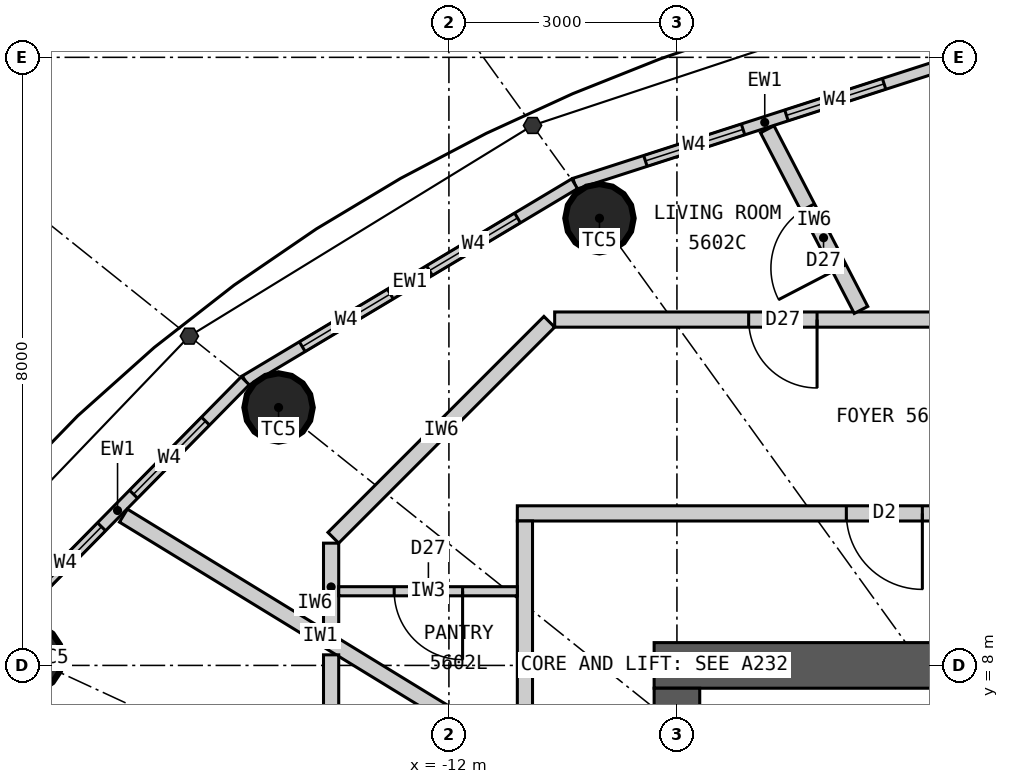
"""IFC4 building model, lengths in metres.
Left out: names, types, materials, properties, quantities, classifications, styles, units other than length and angle.
Written with IfcOpenShell. Run it as: python <this file> out.ifc"""

import sys

from ifc_helpers import new_model, si_unit, direction, frame, frame_2d, origin, origin_2d, place, context, subcontext, project, spatial, rectangle, circle, extrude, element, fill, save


model = new_model("IFC4")
c1 = context("Model", 3, precision=1e-05, world=origin(), true_north=direction((0.0, 1.0)))
c2 = subcontext(c1, "Body", "Model", "MODEL_VIEW")
j1 = project(units=[si_unit("LENGTHUNIT", "METRE"), si_unit("PLANEANGLEUNIT", "RADIAN")], contexts=[c1])
p1 = place(None, origin())
s1 = spatial("IfcSite", under=j1, at=p1, CompositionType="ELEMENT")
p2 = place(p1, origin())
s2 = spatial("IfcBuilding", under=s1, at=p2, CompositionType="ELEMENT")
p3 = place(p2, frame((0.0, 0.0, 209.4)))
s3 = spatial("IfcBuildingStorey", under=s2, at=p3, CompositionType="ELEMENT", Elevation=209.4)
for number, where, z_axis, x_axis in (
    (1, (-10.019, 13.883, 0.0), (0.0, 0.0, 1.0), (1.0, 0.0, 0.0)),
    (2, (-14.241, 11.393, 0.0), (0.0, 0.0, 1.0), (1.0, 0.0, 0.0)),
    (3, (-17.532, 8.098, 0.0), (0.0, 0.0, 1.0), (1.0, 0.0, 0.0)),
):
    element("IfcColumn", number, at=place(p3, frame(where, z_axis=z_axis, x_axis=x_axis)), inside=s3, PredefinedType="COLUMN", context=c2, shape_type="SweptSolid", body=[
        extrude(circle(Radius=0.45, at=origin_2d()), origin(), (0.0, 0.0, 1.0), 3.3),
    ])
p4 = place(p3, frame((-9.3, 8.0, 0.0), z_axis=(0.0, 0.0, 1.0), x_axis=(1.0, 0.0, 0.0)))
e4 = element("IfcWall", 4, at=p4, inside=s3, PredefinedType="SHEAR", context=c2, shape_type="SweptSolid", body=[
    extrude(rectangle(XDim=18.6, YDim=0.6, at=frame_2d((9.3, 0.0))), origin(), (0.0, 0.0, 1.0), 3.3),
])
p5 = place(p4, frame((8.0, 0.0, 0.0)))
e5 = element("IfcOpeningElement", 5, at=p5, cuts=e4, PredefinedType="OPENING", context=c2, shape_type="SweptSolid", body=[
    extrude(rectangle(XDim=1.2, YDim=2.2, at=frame_2d((0.6, 1.1))), frame((0.0, 0.31, 0.0), z_axis=(0.0, -1.0, 0.0), x_axis=(1.0, 0.0, 0.0)), (0.0, 0.0, 1.0), 0.62),
])
p6 = place(p4, frame((15.6, 0.0, 0.0)))
e6 = element("IfcOpeningElement", 6, at=p6, cuts=e4, PredefinedType="OPENING", context=c2, shape_type="SweptSolid", body=[
    extrude(rectangle(XDim=0.9, YDim=2.2, at=frame_2d((0.45, 1.1))), frame((0.0, 0.31, 0.0), z_axis=(0.0, -1.0, 0.0), x_axis=(1.0, 0.0, 0.0)), (0.0, 0.0, 1.0), 0.62),
])
p7 = place(p3, frame((-9.0, 7.7, 0.0), z_axis=(0.0, 0.0, 1.0), x_axis=(0.0, -1.0, 0.0)))
e7 = element("IfcWall", 7, at=p7, inside=s3, PredefinedType="SHEAR", context=c2, shape_type="SweptSolid", body=[
    extrude(rectangle(XDim=15.4, YDim=0.6, at=frame_2d((7.7, 0.0))), origin(), (0.0, 0.0, 1.0), 3.3),
])
p8 = place(p7, frame((6.8, 0.0, 0.0)))
e8 = element("IfcOpeningElement", 8, at=p8, cuts=e7, PredefinedType="OPENING", context=c2, shape_type="SweptSolid", body=[
    extrude(rectangle(XDim=1.8, YDim=2.2, at=frame_2d((0.9, 1.1))), frame((0.0, 0.31, 0.0), z_axis=(0.0, -1.0, 0.0), x_axis=(1.0, 0.0, 0.0)), (0.0, 0.0, 1.0), 0.62),
])
p9 = place(p3, frame((-5.343, 15.952, 0.0), z_axis=(0.0, 0.0, 1.0), x_axis=(-0.951644702515, -0.307200846638, 0.0)))
e9 = element("IfcWall", 9, at=p9, inside=s3, PredefinedType="ELEMENTEDWALL", context=c2, shape_type="SweptSolid", body=[
    extrude(rectangle(XDim=5.258, YDim=0.15, at=frame_2d((2.629, 0.0))), origin(), (0.0, 0.0, 1.0), 3.12),
])
p10 = place(p9, frame((0.979, 0.0, 0.9)))
e10 = element("IfcOpeningElement", 10, at=p10, cuts=e9, PredefinedType="OPENING", context=c2, shape_type="SweptSolid", body=[
    extrude(rectangle(XDim=1.35, YDim=1.9, at=frame_2d((0.675, 0.95))), frame((0.0, 0.085, 0.0), z_axis=(0.0, -1.0, 0.0), x_axis=(1.0, 0.0, 0.0)), (0.0, 0.0, 1.0), 0.17),
])
p11 = place(p9, frame((2.929, 0.0, 0.9)))
e11 = element("IfcOpeningElement", 11, at=p11, cuts=e9, PredefinedType="OPENING", context=c2, shape_type="SweptSolid", body=[
    extrude(rectangle(XDim=1.35, YDim=1.9, at=frame_2d((0.675, 0.95))), frame((0.0, 0.085, 0.0), z_axis=(0.0, -1.0, 0.0), x_axis=(1.0, 0.0, 0.0)), (0.0, 0.0, 1.0), 0.17),
])
p12 = place(p3, frame((-10.346, 14.336, 0.0), z_axis=(0.0, 0.0, 1.0), x_axis=(-0.85822150553, -0.513279502265, 0.0)))
e12 = element("IfcWall", 12, at=p12, inside=s3, PredefinedType="ELEMENTEDWALL", context=c2, shape_type="SweptSolid", body=[
    extrude(rectangle(XDim=5.05, YDim=0.15, at=frame_2d((2.525, 0.0))), origin(), (0.0, 0.0, 1.0), 3.12),
])
p13 = place(p12, frame((0.875, 0.0, 0.9)))
e13 = element("IfcOpeningElement", 13, at=p13, cuts=e12, PredefinedType="OPENING", context=c2, shape_type="SweptSolid", body=[
    extrude(rectangle(XDim=1.35, YDim=1.9, at=frame_2d((0.675, 0.95))), frame((0.0, 0.085, 0.0), z_axis=(0.0, -1.0, 0.0), x_axis=(1.0, 0.0, 0.0)), (0.0, 0.0, 1.0), 0.17),
])
p14 = place(p12, frame((2.825, 0.0, 0.9)))
e14 = element("IfcOpeningElement", 14, at=p14, cuts=e12, PredefinedType="OPENING", context=c2, shape_type="SweptSolid", body=[
    extrude(rectangle(XDim=1.35, YDim=1.9, at=frame_2d((0.675, 0.95))), frame((0.0, 0.085, 0.0), z_axis=(0.0, -1.0, 0.0), x_axis=(1.0, 0.0, 0.0)), (0.0, 0.0, 1.0), 0.17),
])
p15 = place(p3, frame((-14.68, 11.744, 0.0), z_axis=(0.0, 0.0, 1.0), x_axis=(-0.701527379618, -0.712642501993, 0.0)))
e15 = element("IfcWall", 15, at=p15, inside=s3, PredefinedType="ELEMENTEDWALL", context=c2, shape_type="SweptSolid", body=[
    extrude(rectangle(XDim=4.788, YDim=0.15, at=frame_2d((2.394, 0.0))), origin(), (0.0, 0.0, 1.0), 3.12),
])
p16 = place(p15, frame((0.744, 0.0, 0.9)))
e16 = element("IfcOpeningElement", 16, at=p16, cuts=e15, PredefinedType="OPENING", context=c2, shape_type="SweptSolid", body=[
    extrude(rectangle(XDim=1.35, YDim=1.9, at=frame_2d((0.675, 0.95))), frame((0.0, 0.085, 0.0), z_axis=(0.0, -1.0, 0.0), x_axis=(1.0, 0.0, 0.0)), (0.0, 0.0, 1.0), 0.17),
])
p17 = place(p15, frame((2.694, 0.0, 0.9)))
e17 = element("IfcOpeningElement", 17, at=p17, cuts=e15, PredefinedType="OPENING", context=c2, shape_type="SweptSolid", body=[
    extrude(rectangle(XDim=1.35, YDim=1.9, at=frame_2d((0.675, 0.95))), frame((0.0, 0.085, 0.0), z_axis=(0.0, -1.0, 0.0), x_axis=(1.0, 0.0, 0.0)), (0.0, 0.0, 1.0), 0.17),
])
p18 = place(p3, frame((-11.1, 10.0, 0.0), z_axis=(0.0, 0.0, 1.0), x_axis=(1.0, 0.0, 0.0)))
e18 = element("IfcWall", 18, at=p18, inside=s3, PredefinedType="PARTITIONING", context=c2, shape_type="SweptSolid", body=[
    extrude(rectangle(XDim=22.2, YDim=0.2, at=frame_2d((11.1, 0.0))), origin(), (0.0, 0.0, 1.0), 3.12),
])
p19 = place(p18, frame((20.9, 0.0, 0.0)))
e19 = element("IfcOpeningElement", 19, at=p19, cuts=e18, PredefinedType="OPENING", context=c2, shape_type="SweptSolid", body=[
    extrude(rectangle(XDim=1.0, YDim=2.2, at=frame_2d((0.5, 1.1))), frame((0.0, 0.11, 0.0), z_axis=(0.0, -1.0, 0.0), x_axis=(1.0, 0.0, 0.0)), (0.0, 0.0, 1.0), 0.22),
])
p20 = place(p18, frame((4.329, 0.0, 0.0)))
e20 = element("IfcOpeningElement", 20, at=p20, cuts=e18, PredefinedType="OPENING", context=c2, shape_type="SweptSolid", body=[
    extrude(rectangle(XDim=1.0, YDim=2.2, at=frame_2d((0.5, 1.1))), frame((0.0, 0.11, 0.0), z_axis=(0.0, -1.0, 0.0), x_axis=(1.0, 0.0, 0.0)), (0.0, 0.0, 1.0), 0.22),
])
p21 = place(p3, frame((-11.0, 9.9, 0.0), z_axis=(0.0, 0.0, 1.0), x_axis=(0.0, -1.0, 0.0)))
e21 = element("IfcWall", 21, at=p21, inside=s3, PredefinedType="PARTITIONING", context=c2, shape_type="SweptSolid", body=[
    extrude(rectangle(XDim=19.8, YDim=0.2, at=frame_2d((9.9, 0.0))), origin(), (0.0, 0.0, 1.0), 3.12),
])
p22 = place(p21, frame((5.075, 0.0, 0.0)))
e22 = element("IfcOpeningElement", 22, at=p22, cuts=e21, PredefinedType="OPENING", context=c2, shape_type="SweptSolid", body=[
    extrude(rectangle(XDim=1.0, YDim=2.2, at=frame_2d((0.5, 1.1))), frame((0.0, 0.11, 0.0), z_axis=(0.0, -1.0, 0.0), x_axis=(1.0, 0.0, 0.0)), (0.0, 0.0, 1.0), 0.22),
])
p23 = place(p21, frame((18.645, 0.0, 0.0)))
e23 = element("IfcOpeningElement", 23, at=p23, cuts=e21, PredefinedType="OPENING", context=c2, shape_type="SweptSolid", body=[
    extrude(rectangle(XDim=1.0, YDim=2.2, at=frame_2d((0.5, 1.1))), frame((0.0, 0.11, 0.0), z_axis=(0.0, -1.0, 0.0), x_axis=(1.0, 0.0, 0.0)), (0.0, 0.0, 1.0), 0.22),
])
p24 = place(p3, frame((-11.1, 6.797, 0.0), z_axis=(0.0, 0.0, 1.0), x_axis=(-0.852799818179, 0.522237943963, 0.0)))
e24 = element("IfcWall", 24, at=p24, inside=s3, PredefinedType="PARTITIONING", context=c2, shape_type="SweptSolid", body=[
    extrude(rectangle(XDim=6.077, YDim=0.2, at=frame_2d((3.039, 0.0))), origin(), (0.0, 0.0, 1.0), 3.12),
])
p25 = place(p3, frame((6.364, 12.55, 0.0), z_axis=(0.0, 0.0, 1.0), x_axis=(-1.0, 0.0, 0.0)))
e25 = element("IfcWall", 25, at=p25, inside=s3, PredefinedType="PARTITIONING", context=c2, shape_type="SweptSolid", body=[
    extrude(rectangle(XDim=16.972, YDim=0.2, at=frame_2d((8.486, 0.0))), origin(), (0.0, 0.0, 1.0), 3.12),
])
p26 = place(p25, frame((2.525, 0.0, 0.0)))
e26 = element("IfcOpeningElement", 26, at=p26, cuts=e25, PredefinedType="OPENING", context=c2, shape_type="SweptSolid", body=[
    extrude(rectangle(XDim=0.8, YDim=2.1, at=frame_2d((0.4, 1.05))), frame((0.0, 0.11, 0.0), z_axis=(0.0, -1.0, 0.0), x_axis=(1.0, 0.0, 0.0)), (0.0, 0.0, 1.0), 0.22),
])
p27 = place(p25, frame((4.145, 0.0, 0.0)))
e27 = element("IfcOpeningElement", 27, at=p27, cuts=e25, PredefinedType="OPENING", context=c2, shape_type="SweptSolid", body=[
    extrude(rectangle(XDim=0.9, YDim=2.1, at=frame_2d((0.45, 1.05))), frame((0.0, 0.11, 0.0), z_axis=(0.0, -1.0, 0.0), x_axis=(1.0, 0.0, 0.0)), (0.0, 0.0, 1.0), 0.22),
])
p28 = place(p25, frame((13.52, 0.0, 0.0)))
e28 = element("IfcOpeningElement", 28, at=p28, cuts=e25, PredefinedType="OPENING", context=c2, shape_type="SweptSolid", body=[
    extrude(rectangle(XDim=0.9, YDim=2.1, at=frame_2d((0.45, 1.05))), frame((0.0, 0.11, 0.0), z_axis=(0.0, -1.0, 0.0), x_axis=(1.0, 0.0, 0.0)), (0.0, 0.0, 1.0), 0.22),
])
p29 = place(p3, frame((-10.679, 12.521, 0.0), z_axis=(0.0, 0.0, 1.0), x_axis=(-0.707106781187, -0.707106781187, 0.0)))
e29 = element("IfcWall", 29, at=p29, inside=s3, PredefinedType="PARTITIONING", context=c2, shape_type="SweptSolid", body=[
    extrude(rectangle(XDim=4.019, YDim=0.2, at=frame_2d((2.009, 0.0))), origin(), (0.0, 0.0, 1.0), 3.12),
])
p30 = place(p3, frame((-13.55, 9.609, 0.0), z_axis=(0.0, 0.0, 1.0), x_axis=(0.0, -1.0, 0.0)))
e30 = element("IfcWall", 30, at=p30, inside=s3, PredefinedType="PARTITIONING", context=c2, shape_type="SweptSolid", body=[
    extrude(rectangle(XDim=1.153, YDim=0.2, at=frame_2d((0.576, 0.0))), origin(), (0.0, 0.0, 1.0), 3.12),
])
p31 = place(p3, frame((-6.578, 12.677, 0.0), z_axis=(0.0, 0.0, 1.0), x_axis=(-0.460620531465, 0.887597164255, 0.0)))
e31 = element("IfcWall", 31, at=p31, inside=s3, PredefinedType="PARTITIONING", context=c2, shape_type="SweptSolid", body=[
    extrude(rectangle(XDim=2.678, YDim=0.2, at=frame_2d((1.339, 0.0))), origin(), (0.0, 0.0, 1.0), 3.12),
])
p32 = place(p31, frame((0.62, 0.0, 0.0)))
e32 = element("IfcOpeningElement", 32, at=p32, cuts=e31, PredefinedType="OPENING", context=c2, shape_type="SweptSolid", body=[
    extrude(rectangle(XDim=0.9, YDim=2.1, at=frame_2d((0.45, 1.05))), frame((0.0, 0.11, 0.0), z_axis=(0.0, -1.0, 0.0), x_axis=(1.0, 0.0, 0.0)), (0.0, 0.0, 1.0), 0.22),
])
p33 = place(p3, frame((-11.1, 8.976, 0.0), z_axis=(0.0, 0.0, 1.0), x_axis=(-1.0, 0.0, 0.0)))
e33 = element("IfcWall", 33, at=p33, inside=s3, PredefinedType="PARTITIONING", context=c2, shape_type="SweptSolid", body=[
    extrude(rectangle(XDim=2.35, YDim=0.12, at=frame_2d((1.175, 0.0))), origin(), (0.0, 0.0, 1.0), 3.12),
])
p34 = place(p33, frame((0.72, 0.0, 0.0)))
e34 = element("IfcOpeningElement", 34, at=p34, cuts=e33, PredefinedType="OPENING", context=c2, shape_type="SweptSolid", body=[
    extrude(rectangle(XDim=0.9, YDim=2.1, at=frame_2d((0.45, 1.05))), frame((0.0, 0.07, 0.0), z_axis=(0.0, -1.0, 0.0), x_axis=(1.0, 0.0, 0.0)), (0.0, 0.0, 1.0), 0.14),
])
p35 = place(p3, frame((-13.55, 8.139, 0.0), z_axis=(0.0, 0.0, 1.0), x_axis=(0.0, -1.0, 0.0)))
e35 = element("IfcWall", 35, at=p35, inside=s3, PredefinedType="PARTITIONING", context=c2, shape_type="SweptSolid", body=[
    extrude(rectangle(XDim=12.496, YDim=0.2, at=frame_2d((6.248, 0.0))), origin(), (0.0, 0.0, 1.0), 3.12),
])
p36 = place(p35, frame((7.031, 0.0, 0.0)))
e36 = element("IfcOpeningElement", 36, at=p36, cuts=e35, PredefinedType="OPENING", context=c2, shape_type="SweptSolid", body=[
    extrude(rectangle(XDim=0.9, YDim=2.1, at=frame_2d((0.45, 1.05))), frame((0.0, 0.11, 0.0), z_axis=(0.0, -1.0, 0.0), x_axis=(1.0, 0.0, 0.0)), (0.0, 0.0, 1.0), 0.22),
])
p37 = place(p35, frame((9.373, 0.0, 0.0)))
e37 = element("IfcOpeningElement", 37, at=p37, cuts=e35, PredefinedType="OPENING", context=c2, shape_type="SweptSolid", body=[
    extrude(rectangle(XDim=0.8, YDim=2.1, at=frame_2d((0.4, 1.05))), frame((0.0, 0.11, 0.0), z_axis=(0.0, -1.0, 0.0), x_axis=(1.0, 0.0, 0.0)), (0.0, 0.0, 1.0), 0.22),
])
p38 = place(p35, frame((3.789, 0.0, 0.0)))
e38 = element("IfcOpeningElement", 38, at=p38, cuts=e35, PredefinedType="OPENING", context=c2, shape_type="SweptSolid", body=[
    extrude(rectangle(XDim=0.9, YDim=2.1, at=frame_2d((0.45, 1.05))), frame((0.0, 0.11, 0.0), z_axis=(0.0, -1.0, 0.0), x_axis=(1.0, 0.0, 0.0)), (0.0, 0.0, 1.0), 0.22),
])
p39 = place(p10, origin())
e39 = element("IfcWindow", 39, at=p39, inside=s3, PartitioningType="SINGLE_PANEL", PredefinedType="WINDOW", context=c2, shape_type="SweptSolid", body=[
    extrude(rectangle(XDim=1.35, YDim=1.9, at=frame_2d((0.675, 0.95))), frame((0.0, 0.03, 0.0), z_axis=(0.0, -1.0, 0.0), x_axis=(1.0, 0.0, 0.0)), (0.0, 0.0, 1.0), 0.06),
])
fill(e10, e39)
p40 = place(p11, origin())
e40 = element("IfcWindow", 40, at=p40, inside=s3, PartitioningType="SINGLE_PANEL", PredefinedType="WINDOW", context=c2, shape_type="SweptSolid", body=[
    extrude(rectangle(XDim=1.35, YDim=1.9, at=frame_2d((0.675, 0.95))), frame((0.0, 0.03, 0.0), z_axis=(0.0, -1.0, 0.0), x_axis=(1.0, 0.0, 0.0)), (0.0, 0.0, 1.0), 0.06),
])
fill(e11, e40)
p41 = place(p13, origin())
e41 = element("IfcWindow", 41, at=p41, inside=s3, PartitioningType="SINGLE_PANEL", PredefinedType="WINDOW", context=c2, shape_type="SweptSolid", body=[
    extrude(rectangle(XDim=1.35, YDim=1.9, at=frame_2d((0.675, 0.95))), frame((0.0, 0.03, 0.0), z_axis=(0.0, -1.0, 0.0), x_axis=(1.0, 0.0, 0.0)), (0.0, 0.0, 1.0), 0.06),
])
fill(e13, e41)
p42 = place(p14, origin())
e42 = element("IfcWindow", 42, at=p42, inside=s3, PartitioningType="SINGLE_PANEL", PredefinedType="WINDOW", context=c2, shape_type="SweptSolid", body=[
    extrude(rectangle(XDim=1.35, YDim=1.9, at=frame_2d((0.675, 0.95))), frame((0.0, 0.03, 0.0), z_axis=(0.0, -1.0, 0.0), x_axis=(1.0, 0.0, 0.0)), (0.0, 0.0, 1.0), 0.06),
])
fill(e14, e42)
p43 = place(p16, origin())
e43 = element("IfcWindow", 43, at=p43, inside=s3, PartitioningType="SINGLE_PANEL", PredefinedType="WINDOW", context=c2, shape_type="SweptSolid", body=[
    extrude(rectangle(XDim=1.35, YDim=1.9, at=frame_2d((0.675, 0.95))), frame((0.0, 0.03, 0.0), z_axis=(0.0, -1.0, 0.0), x_axis=(1.0, 0.0, 0.0)), (0.0, 0.0, 1.0), 0.06),
])
fill(e16, e43)
p44 = place(p17, origin())
e44 = element("IfcWindow", 44, at=p44, inside=s3, PartitioningType="SINGLE_PANEL", PredefinedType="WINDOW", context=c2, shape_type="SweptSolid", body=[
    extrude(rectangle(XDim=1.35, YDim=1.9, at=frame_2d((0.675, 0.95))), frame((0.0, 0.03, 0.0), z_axis=(0.0, -1.0, 0.0), x_axis=(1.0, 0.0, 0.0)), (0.0, 0.0, 1.0), 0.06),
])
fill(e17, e44)
p45 = place(p20, origin())
e45 = element("IfcDoor", 45, at=p45, inside=s3, OperationType="SINGLE_SWING_RIGHT", PredefinedType="DOOR", context=c2, shape_type="SweptSolid", body=[
    extrude(rectangle(XDim=1.0, YDim=2.2, at=frame_2d((0.5, 1.1))), frame((0.0, 0.025, 0.0), z_axis=(0.0, -1.0, 0.0), x_axis=(1.0, 0.0, 0.0)), (0.0, 0.0, 1.0), 0.05),
])
fill(e20, e45)
p46 = place(p34, origin())
e46 = element("IfcDoor", 46, at=p46, inside=s3, OperationType="SINGLE_SWING_LEFT", PredefinedType="DOOR", context=c2, shape_type="SweptSolid", body=[
    extrude(rectangle(XDim=0.9, YDim=2.1, at=frame_2d((0.45, 1.05))), frame((0.0, 0.025, 0.0), z_axis=(0.0, -1.0, 0.0), x_axis=(1.0, 0.0, 0.0)), (0.0, 0.0, 1.0), 0.05),
])
fill(e34, e46)
p47 = place(p28, origin())
e47 = element("IfcDoor", 47, at=p47, inside=s3, OperationType="SINGLE_SWING_LEFT", PredefinedType="DOOR", context=c2, shape_type="SweptSolid", body=[
    extrude(rectangle(XDim=0.9, YDim=2.1, at=frame_2d((0.45, 1.05))), frame((0.0, 0.025, 0.0), z_axis=(0.0, -1.0, 0.0), x_axis=(1.0, 0.0, 0.0)), (0.0, 0.0, 1.0), 0.05),
])
fill(e28, e47)
p48 = place(p32, origin())
e48 = element("IfcDoor", 48, at=p48, inside=s3, OperationType="SINGLE_SWING_LEFT", PredefinedType="DOOR", context=c2, shape_type="SweptSolid", body=[
    extrude(rectangle(XDim=0.9, YDim=2.1, at=frame_2d((0.45, 1.05))), frame((0.0, 0.025, 0.0), z_axis=(0.0, -1.0, 0.0), x_axis=(1.0, 0.0, 0.0)), (0.0, 0.0, 1.0), 0.05),
])
fill(e32, e48)
save(model, sys.argv[1])
